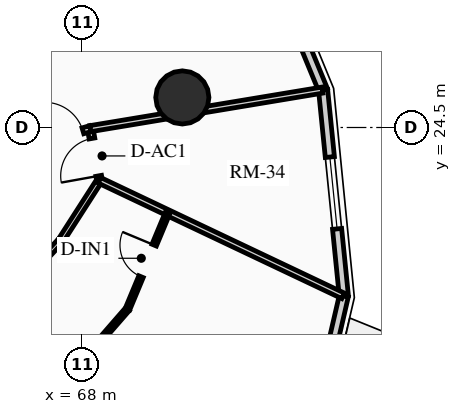
"""IFC4 building model, lengths in metres.
Left out: names, types, materials, properties, quantities, classifications, styles, units other than length and angle.
Written with IfcOpenShell. Run it as: python <this file> out.ifc"""

import sys

from ifc_helpers import new_model, si_unit, direction, frame, frame_2d, origin, origin_2d, place, context, subcontext, project, spatial, rectangle, circle, extrude, source, transform, mapped, element, fill, save


model = new_model("IFC4")
c1 = context("Model", 3, precision=1e-05, world=origin(), true_north=direction((0.0, 1.0)))
c2 = subcontext(c1, "Body", "Model", "MODEL_VIEW")
j1 = project(units=[si_unit("LENGTHUNIT", "METRE"), si_unit("PLANEANGLEUNIT", "RADIAN")], contexts=[c1])
p1 = place(None, origin())
s1 = spatial("IfcSite", under=j1, at=p1, CompositionType="ELEMENT")
p2 = place(p1, origin())
s2 = spatial("IfcBuilding", under=s1, at=p2, CompositionType="ELEMENT")
p3 = place(p2, frame((0.0, 0.0, 110.89)))
s3 = spatial("IfcBuildingStorey", under=s2, at=p3, CompositionType="ELEMENT", Elevation=110.89)
p4 = place(p3, frame((70.635, 25.291, 0.0), z_axis=(0.0, 0.0, 1.0), x_axis=(1.0, 0.0, 0.0)))
e1 = element("IfcColumn", 1, at=p4, inside=s3, PredefinedType="USERDEFINED", context=c2, shape_type="SweptSolid", body=[
    extrude(circle(Radius=0.7, at=origin_2d()), origin(), (0.0, 0.0, 1.0), 2.91),
])
p5 = place(p3, frame((74.885, 20.067, 0.0), z_axis=(0.0, 0.0, 1.0), x_axis=(-0.225834725257, -0.974165631126, 0.0)))
e2 = element("IfcWall", 2, at=p5, inside=s3, PredefinedType="SOLIDWALL", context=c2, shape_type="SweptSolid", body=[
    extrude(rectangle(XDim=5.119, YDim=0.24, at=frame_2d((2.56, 0.0))), origin(), (0.0, 0.0, 1.0), 2.179),
])
p6 = place(p3, frame((74.339, 25.487, 0.0), z_axis=(0.0, 0.0, 1.0), x_axis=(0.10015591906, -0.994971754311, 0.0)))
e3 = element("IfcWall", 3, at=p6, inside=s3, PredefinedType="SOLIDWALL", context=c2, shape_type="SweptSolid", body=[
    extrude(rectangle(XDim=5.448, YDim=0.24, at=frame_2d((2.724, 0.0))), origin(), (0.0, 0.0, 1.0), 2.179),
])
m1 = source(origin(), c2, "Body", "SweptSolid", [
    extrude(rectangle(XDim=1.9, YDim=1.35, at=frame_2d((0.95, 0.675))), frame((0.0, 0.13, 0.0), z_axis=(0.0, -1.0, 0.0), x_axis=(1.0, 0.0, 0.0)), (0.0, 0.0, 1.0), 0.26),
])
p7 = place(p6, frame((1.774, 0.0, 0.65)))
e4 = element("IfcOpeningElement", 4, at=p7, cuts=e3, PredefinedType="OPENING", context=c2, shape_type="MappedRepresentation", body=[
    mapped(m1, transform((0.0, 0.0, 0.0), x_axis=(1.0, 0.0, 0.0), y_axis=(0.0, 1.0, 0.0), z_axis=(0.0, 0.0, 1.0), scale=1.0)),
])
p8 = place(p3, frame((72.145, 30.811, 0.0), z_axis=(0.0, 0.0, 1.0), x_axis=(0.381027003055, -0.924563909604, 0.0)))
e5 = element("IfcWall", 5, at=p8, inside=s3, PredefinedType="SOLIDWALL", context=c2, shape_type="SweptSolid", body=[
    extrude(rectangle(XDim=5.758, YDim=0.24, at=frame_2d((2.879, 0.0))), origin(), (0.0, 0.0, 1.0), 2.179),
])
p9 = place(p3, frame((62.903, 16.667, 0.0), z_axis=(0.0, 0.0, 1.0), x_axis=(0.682371947497, 0.731005147225, 0.0)))
e6 = element("IfcWall", 6, at=p9, inside=s3, PredefinedType="PARTITIONING", context=c2, shape_type="SweptSolid", body=[
    extrude(rectangle(XDim=6.642, YDim=0.15, at=frame_2d((3.321, 0.0))), origin(), (0.0, 0.0, 1.0), 2.225),
])
m2 = source(origin(), c2, "Body", "SweptSolid", [
    extrude(rectangle(XDim=1.05, YDim=2.015, at=frame_2d((0.525, 1.007))), frame((0.0, 0.085, 0.0), z_axis=(0.0, -1.0, 0.0), x_axis=(1.0, 0.0, 0.0)), (0.0, 0.0, 1.0), 0.17),
])
p10 = place(p9, frame((2.796, 0.0, 0.0)))
e7 = element("IfcOpeningElement", 7, at=p10, cuts=e6, PredefinedType="OPENING", context=c2, shape_type="MappedRepresentation", body=[
    mapped(m2, transform((0.0, 0.0, 0.0), x_axis=(1.0, 0.0, 0.0), y_axis=(0.0, 1.0, 0.0), z_axis=(0.0, 0.0, 1.0), scale=1.0)),
])
p11 = place(p3, frame((67.435, 21.521, 0.0), z_axis=(0.0, 0.0, 1.0), x_axis=(0.540777197838, 0.841165870859, 0.0)))
e8 = element("IfcWall", 8, at=p11, inside=s3, PredefinedType="PARTITIONING", context=c2, shape_type="SweptSolid", body=[
    extrude(rectangle(XDim=1.888, YDim=0.15, at=frame_2d((0.944, 0.0))), origin(), (0.0, 0.0, 1.0), 2.225),
])
p12 = place(p3, frame((68.456, 23.11, 0.0), z_axis=(0.0, 0.0, 1.0), x_axis=(-0.1772522795, 0.984165448191, 0.0)))
e9 = element("IfcWall", 9, at=p12, inside=s3, PredefinedType="PARTITIONING", context=c2, shape_type="SweptSolid", body=[
    extrude(rectangle(XDim=1.382, YDim=0.15, at=frame_2d((0.691, 0.0))), origin(), (0.0, 0.0, 1.0), 2.225),
])
m3 = source(origin(), c2, "Body", "SweptSolid", [
    extrude(rectangle(XDim=1.0, YDim=2.015, at=frame_2d((0.5, 1.007))), frame((0.0, 0.085, 0.0), z_axis=(0.0, -1.0, 0.0), x_axis=(1.0, 0.0, 0.0)), (0.0, 0.0, 1.0), 0.17),
])
p13 = place(p12, frame((0.12, 0.0, 0.0)))
e10 = element("IfcOpeningElement", 10, at=p13, cuts=e9, PredefinedType="OPENING", context=c2, shape_type="MappedRepresentation", body=[
    mapped(m3, transform((0.0, 0.0, 0.0), x_axis=(1.0, 0.0, 0.0), y_axis=(0.0, 1.0, 0.0), z_axis=(0.0, 0.0, 1.0), scale=1.0)),
])
p14 = place(p3, frame((68.456, 23.11, 0.0), z_axis=(0.0, 0.0, 1.0), x_axis=(0.903539425667, -0.428504966442, 0.0)))
e11 = element("IfcWall", 11, at=p14, inside=s3, PredefinedType="PARTITIONING", context=c2, shape_type="SweptSolid", body=[
    extrude(rectangle(XDim=7.094, YDim=0.16, at=frame_2d((3.547, 0.0))), origin(), (0.0, 0.0, 1.0), 2.179),
])
p15 = place(p3, frame((68.211, 24.469, 0.0), z_axis=(0.0, 0.0, 1.0), x_axis=(0.986479033329, 0.163887512651, 0.0)))
e12 = element("IfcWall", 12, at=p15, inside=s3, PredefinedType="PARTITIONING", context=c2, shape_type="SweptSolid", body=[
    extrude(rectangle(XDim=6.193, YDim=0.16, at=frame_2d((3.096, 0.0))), origin(), (0.0, 0.0, 1.0), 2.179),
])
p16 = place(p3, frame((66.056, 23.828, 0.0), z_axis=(0.0, 0.0, 1.0), x_axis=(0.958475403544, 0.285175210708, 0.0)))
e13 = element("IfcWall", 13, at=p16, inside=s3, PredefinedType="PARTITIONING", context=c2, shape_type="SweptSolid", body=[
    extrude(rectangle(XDim=2.248, YDim=0.16, at=frame_2d((1.124, 0.0))), origin(), (0.0, 0.0, 1.0), 2.225),
])
m4 = source(origin(), c2, "Body", "SweptSolid", [
    extrude(rectangle(XDim=1.05, YDim=2.015, at=frame_2d((0.525, 1.007))), frame((0.0, 0.09, 0.0), z_axis=(0.0, -1.0, 0.0), x_axis=(1.0, 0.0, 0.0)), (0.0, 0.0, 1.0), 0.18),
])
p17 = place(p16, frame((0.998, 0.0, 0.0)))
e14 = element("IfcOpeningElement", 14, at=p17, cuts=e13, PredefinedType="OPENING", context=c2, shape_type="MappedRepresentation", body=[
    mapped(m4, transform((0.0, 0.0, 0.0), x_axis=(1.0, 0.0, 0.0), y_axis=(0.0, 1.0, 0.0), z_axis=(0.0, 0.0, 1.0), scale=1.0)),
])
p18 = place(p3, frame((65.162, 15.088, 0.0), z_axis=(0.0, 0.0, 1.0), x_axis=(0.656379509785, 0.754430871011, 0.0)))
e15 = element("IfcWall", 15, at=p18, inside=s3, PredefinedType="PARTITIONING", context=c2, shape_type="SweptSolid", body=[
    extrude(rectangle(XDim=6.14, YDim=0.125, at=frame_2d((3.07, 0.0))), origin(), (0.0, 0.0, 1.0), 2.225),
])
p19 = place(p3, frame((69.192, 19.72, 0.0), z_axis=(0.0, 0.0, 1.0), x_axis=(0.384899070029, 0.922958669655, 0.0)))
e16 = element("IfcWall", 16, at=p19, inside=s3, PredefinedType="PARTITIONING", context=c2, shape_type="SweptSolid", body=[
    extrude(rectangle(XDim=2.75, YDim=0.125, at=frame_2d((1.375, 0.0))), origin(), (0.0, 0.0, 1.0), 2.179),
])
m5 = source(origin(), c2, "Body", "SweptSolid", [
    extrude(rectangle(XDim=0.9, YDim=2.005, at=frame_2d((0.45, 1.002))), frame((0.0, 0.073, 0.0), z_axis=(0.0, -1.0, 0.0), x_axis=(1.0, 0.0, 0.0)), (0.0, 0.0, 1.0), 0.145),
])
p20 = place(p19, frame((0.925, 0.0, 0.0)))
e17 = element("IfcOpeningElement", 17, at=p20, cuts=e16, PredefinedType="OPENING", context=c2, shape_type="MappedRepresentation", body=[
    mapped(m5, transform((0.0, 0.0, 0.0), x_axis=(1.0, 0.0, 0.0), y_axis=(0.0, 1.0, 0.0), z_axis=(0.0, 0.0, 1.0), scale=1.0)),
])
m6 = source(origin(), c2, "Body", "SweptSolid", [
    extrude(rectangle(XDim=1.9, YDim=1.35, at=frame_2d((0.95, 0.675))), frame((0.0, 0.03, 0.0), z_axis=(0.0, -1.0, 0.0), x_axis=(1.0, 0.0, 0.0)), (0.0, 0.0, 1.0), 0.06),
])
p21 = place(p7, origin())
e18 = element("IfcWindow", 18, at=p21, inside=s3, PartitioningType="DOUBLE_PANEL_VERTICAL", PredefinedType="WINDOW", context=c2, shape_type="MappedRepresentation", body=[
    mapped(m6, transform((0.0, 0.0, 0.0), x_axis=(1.0, 0.0, 0.0), y_axis=(0.0, 1.0, 0.0), z_axis=(0.0, 0.0, 1.0), scale=1.0)),
])
fill(e4, e18)
m7 = source(origin(), c2, "Body", "SweptSolid", [
    extrude(rectangle(XDim=1.05, YDim=2.015, at=frame_2d((0.525, 1.007))), frame((0.0, 0.025, 0.0), z_axis=(0.0, -1.0, 0.0), x_axis=(1.0, 0.0, 0.0)), (0.0, 0.0, 1.0), 0.05),
])
p22 = place(p17, origin())
e19 = element("IfcDoor", 19, at=p22, inside=s3, OperationType="SINGLE_SWING_LEFT", PredefinedType="DOOR", context=c2, shape_type="MappedRepresentation", body=[
    mapped(m7, transform((0.0, 0.0, 0.0), x_axis=(1.0, 0.0, 0.0), y_axis=(0.0, 1.0, 0.0), z_axis=(0.0, 0.0, 1.0), scale=1.0)),
])
fill(e14, e19)
m8 = source(origin(), c2, "Body", "SweptSolid", [
    extrude(rectangle(XDim=0.9, YDim=2.005, at=frame_2d((0.45, 1.002))), frame((0.0, 0.025, 0.0), z_axis=(0.0, -1.0, 0.0), x_axis=(1.0, 0.0, 0.0)), (0.0, 0.0, 1.0), 0.05),
])
p23 = place(p20, origin())
e20 = element("IfcDoor", 20, at=p23, inside=s3, OperationType="SINGLE_SWING_RIGHT", PredefinedType="DOOR", context=c2, shape_type="MappedRepresentation", body=[
    mapped(m8, transform((0.0, 0.0, 0.0), x_axis=(1.0, 0.0, 0.0), y_axis=(0.0, 1.0, 0.0), z_axis=(0.0, 0.0, 1.0), scale=1.0)),
])
fill(e17, e20)
m9 = source(origin(), c2, "Body", "SweptSolid", [
    extrude(rectangle(XDim=1.0, YDim=2.015, at=frame_2d((0.5, 1.007))), frame((0.0, 0.025, 0.0), z_axis=(0.0, -1.0, 0.0), x_axis=(1.0, 0.0, 0.0)), (0.0, 0.0, 1.0), 0.05),
])
p24 = place(p13, origin())
e21 = element("IfcDoor", 21, at=p24, inside=s3, OperationType="SINGLE_SWING_LEFT", PredefinedType="DOOR", context=c2, shape_type="MappedRepresentation", body=[
    mapped(m9, transform((0.0, 0.0, 0.0), x_axis=(1.0, 0.0, 0.0), y_axis=(0.0, 1.0, 0.0), z_axis=(0.0, 0.0, 1.0), scale=1.0)),
])
fill(e10, e21)
save(model, sys.argv[1])
